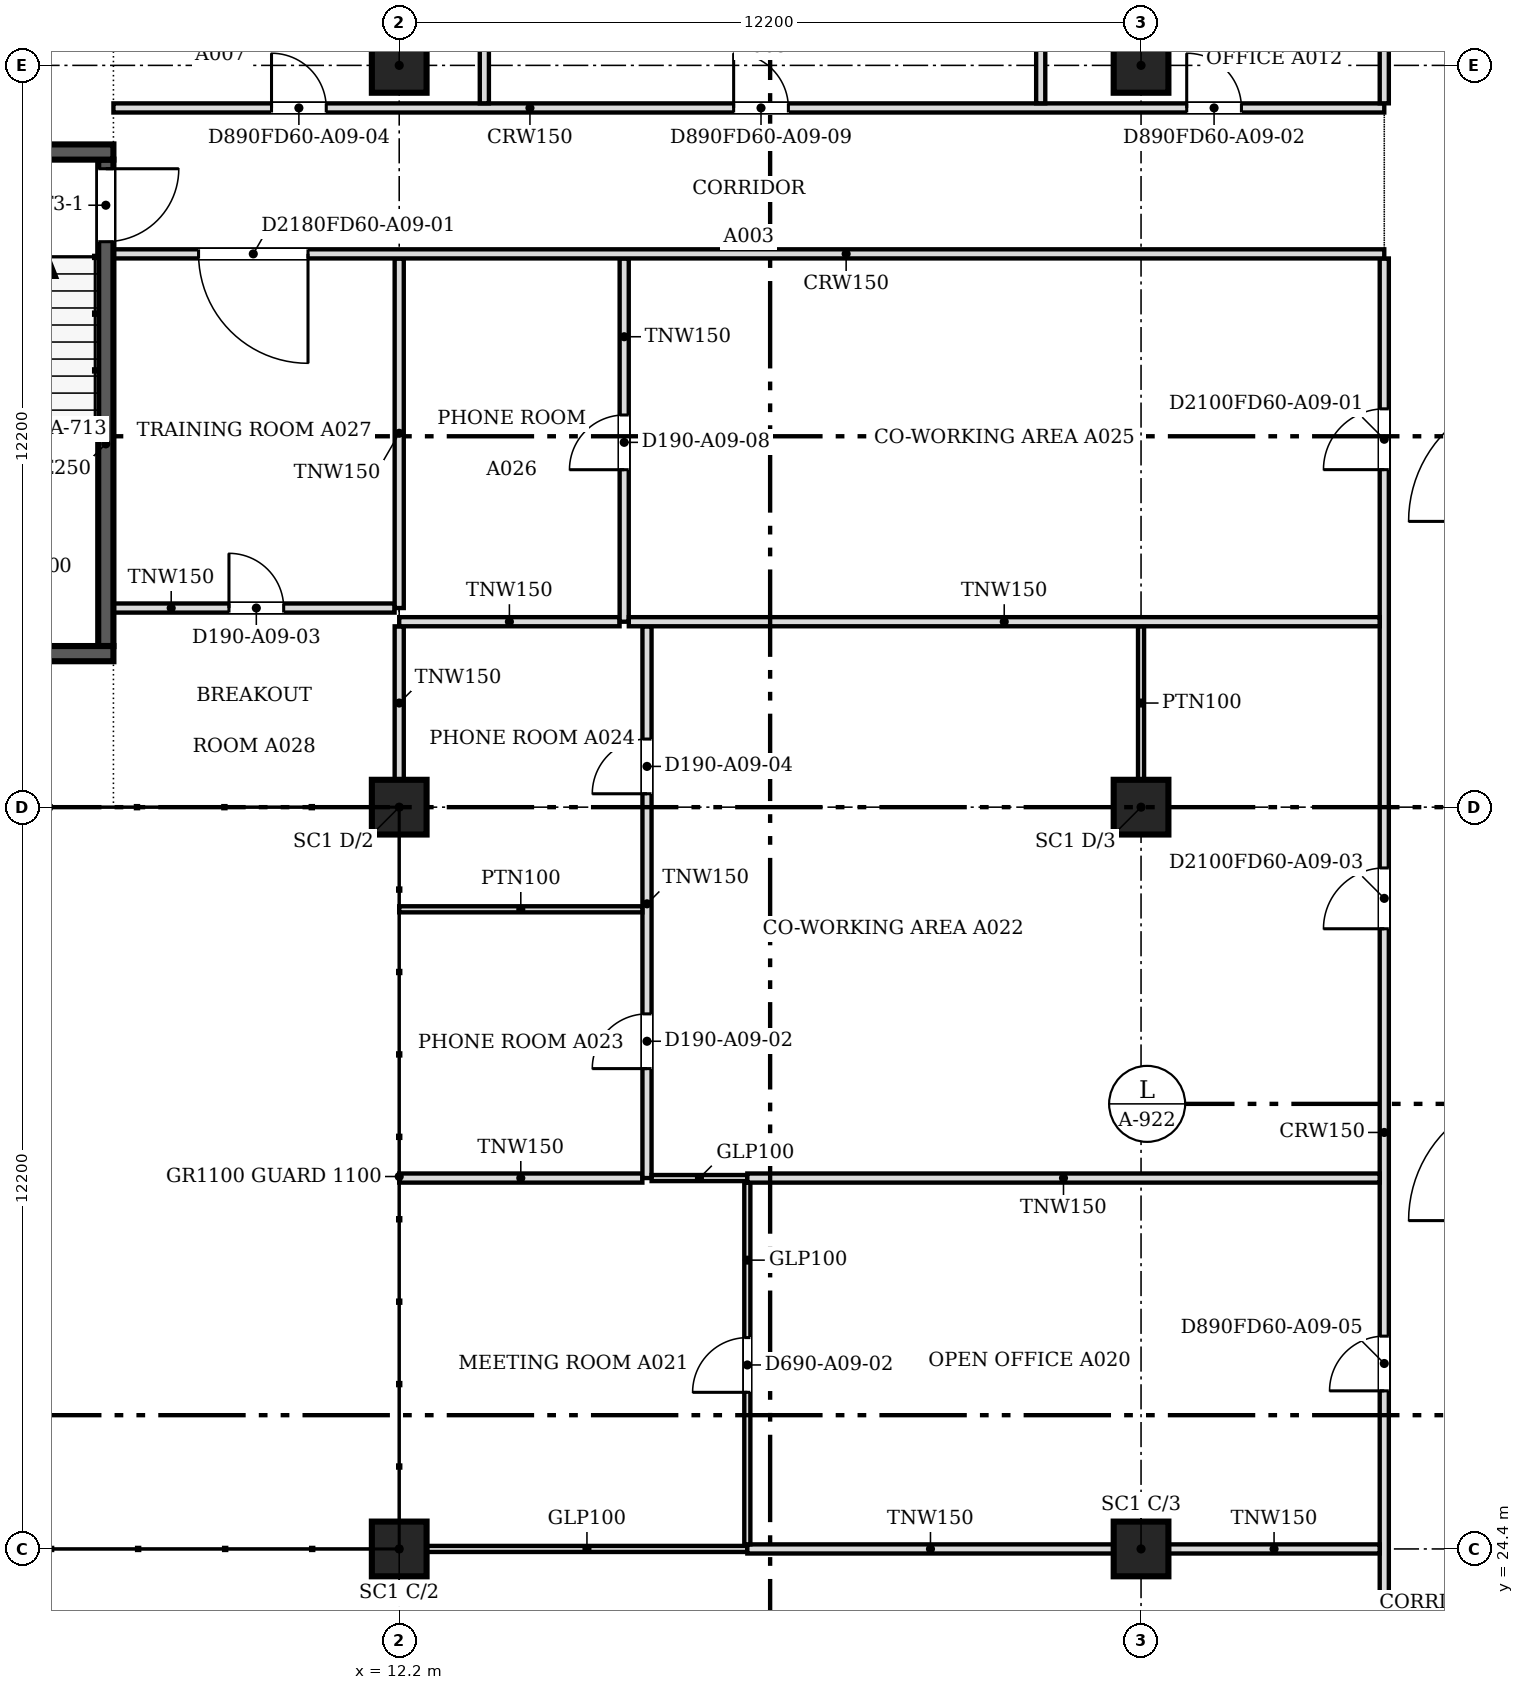
"""IFC4 building model, lengths in metres.
Left out: names, types, materials, properties, quantities, classifications, styles, units other than length and angle.
Written with IfcOpenShell. Run it as: python <this file> out.ifc"""

import sys

from ifc_helpers import new_model, si_unit, direction, frame, frame_2d, origin, origin_2d, place, context, subcontext, project, spatial, rectangle, extrude, source, transform, mapped, element, fill, save


model = new_model("IFC4")
c1 = context("Model", 3, precision=1e-05, world=origin(), true_north=direction((0.0, 1.0)))
c2 = subcontext(c1, "Body", "Model", "MODEL_VIEW")
j1 = project(units=[si_unit("LENGTHUNIT", "METRE"), si_unit("PLANEANGLEUNIT", "RADIAN")], contexts=[c1])
p1 = place(None, origin())
s1 = spatial("IfcSite", under=j1, at=p1, CompositionType="ELEMENT")
p2 = place(p1, origin())
s2 = spatial("IfcBuilding", under=s1, at=p2, CompositionType="ELEMENT")
p3 = place(p2, frame((0.0, 0.0, 102.8)))
s3 = spatial("IfcBuildingStorey", under=s2, at=p3, CompositionType="ELEMENT", Elevation=102.8)
for number, where, z_axis, x_axis in (
    (1, (12.2, 24.4, 0.0), (0.0, 0.0, 1.0), (1.0, 0.0, 0.0)),
    (2, (12.2, 36.6, 0.0), (0.0, 0.0, 1.0), (1.0, 0.0, 0.0)),
    (3, (12.2, 48.8, 0.0), (0.0, 0.0, 1.0), (1.0, 0.0, 0.0)),
    (4, (24.4, 24.4, 0.0), (0.0, 0.0, 1.0), (1.0, 0.0, 0.0)),
    (5, (24.4, 36.6, 0.0), (0.0, 0.0, 1.0), (1.0, 0.0, 0.0)),
    (6, (24.4, 48.8, 0.0), (0.0, 0.0, 1.0), (1.0, 0.0, 0.0)),
):
    element("IfcColumn", number, at=place(p3, frame(where, z_axis=z_axis, x_axis=x_axis)), inside=s3, PredefinedType="COLUMN", context=c2, shape_type="SweptSolid", body=[
        extrude(rectangle(XDim=0.9, YDim=0.9, at=origin_2d()), origin(), (0.0, 0.0, 1.0), 3.55),
    ])
for number, where, z_axis, x_axis in (
    (7, (7.5, 39.125, 0.0), (0.0, 0.0, 1.0), (-1.0, 0.0, 0.0)),
    (8, (3.6, 47.375, 0.0), (0.0, 0.0, 1.0), (1.0, 0.0, 0.0)),
):
    element("IfcWall", number, at=place(p3, frame(where, z_axis=z_axis, x_axis=x_axis)), inside=s3, PredefinedType="SOLIDWALL", context=c2, shape_type="SweptSolid", body=[
        extrude(rectangle(XDim=3.9, YDim=0.25, at=frame_2d((1.95, 0.0))), origin(), (0.0, 0.0, 1.0), 3.8),
    ])
p4 = place(p3, frame((7.375, 47.25, 0.0), z_axis=(0.0, 0.0, 1.0), x_axis=(0.0, -1.0, 0.0)))
e9 = element("IfcWall", 9, at=p4, inside=s3, PredefinedType="SOLIDWALL", context=c2, shape_type="SweptSolid", body=[
    extrude(rectangle(XDim=8.0, YDim=0.25, at=frame_2d((4.0, 0.0))), origin(), (0.0, 0.0, 1.0), 3.8),
])
m1 = source(origin(), c2, "Body", "SweptSolid", [
    extrude(rectangle(XDim=1.2, YDim=2.1, at=frame_2d((0.6, 1.05))), frame((0.0, 0.135, 0.0), z_axis=(0.0, -1.0, 0.0), x_axis=(1.0, 0.0, 0.0)), (0.0, 0.0, 1.0), 0.27),
])
p5 = place(p4, frame((0.15, 0.0, 0.0)))
e10 = element("IfcOpeningElement", 10, at=p5, cuts=e9, PredefinedType="OPENING", context=c2, shape_type="MappedRepresentation", body=[
    mapped(m1, transform((0.0, 0.0, 0.0), scale=1.0)),
])
p6 = place(p3, frame((28.4, 18.8, 0.0), z_axis=(0.0, 0.0, 1.0), x_axis=(0.0, 1.0, 0.0)))
e11 = element("IfcWall", 11, at=p6, inside=s3, PredefinedType="PARTITIONING", context=c2, shape_type="SweptSolid", body=[
    extrude(rectangle(XDim=26.824, YDim=0.15, at=frame_2d((13.412, 0.0))), origin(), (0.0, 0.0, 1.0), 2.715),
])
m2 = source(origin(), c2, "Body", "SweptSolid", [
    extrude(rectangle(XDim=0.9, YDim=2.1, at=frame_2d((0.45, 1.05))), frame((0.0, 0.085, 0.0), z_axis=(0.0, -1.0, 0.0), x_axis=(1.0, 0.0, 0.0)), (0.0, 0.0, 1.0), 0.17),
])
p7 = place(p6, frame((1.3, 0.0, 0.0)))
e12 = element("IfcOpeningElement", 12, at=p7, cuts=e11, PredefinedType="OPENING", context=c2, shape_type="MappedRepresentation", body=[
    mapped(m2, transform((0.0, 0.0, 0.0), scale=1.0)),
])
m3 = source(origin(), c2, "Body", "SweptSolid", [
    extrude(rectangle(XDim=1.0, YDim=2.1, at=frame_2d((0.5, 1.05))), frame((0.0, 0.085, 0.0), z_axis=(0.0, -1.0, 0.0), x_axis=(1.0, 0.0, 0.0)), (0.0, 0.0, 1.0), 0.17),
])
p8 = place(p6, frame((23.351, 0.0, 0.0)))
e13 = element("IfcOpeningElement", 13, at=p8, cuts=e11, PredefinedType="OPENING", context=c2, shape_type="MappedRepresentation", body=[
    mapped(m3, transform((0.0, 0.0, 0.0), scale=1.0)),
])
p9 = place(p6, frame((8.2, 0.0, 0.0)))
e14 = element("IfcOpeningElement", 14, at=p9, cuts=e11, PredefinedType="OPENING", context=c2, shape_type="MappedRepresentation", body=[
    mapped(m2, transform((0.0, 0.0, 0.0), scale=1.0)),
])
p10 = place(p6, frame((15.8, 0.0, 0.0)))
e15 = element("IfcOpeningElement", 15, at=p10, cuts=e11, PredefinedType="OPENING", context=c2, shape_type="MappedRepresentation", body=[
    mapped(m3, transform((0.0, 0.0, 0.0), scale=1.0)),
])
p11 = place(p3, frame((12.651, 24.4, 0.0), z_axis=(0.0, 0.0, 1.0), x_axis=(1.0, 0.0, 0.0)))
e16 = element("IfcWall", 16, at=p11, inside=s3, PredefinedType="PARTITIONING", context=c2, shape_type="SweptSolid", body=[
    extrude(rectangle(XDim=5.273, YDim=0.1, at=frame_2d((2.637, 0.0))), origin(), (0.0, 0.0, 1.0), 2.715),
])
p12 = place(p3, frame((17.925, 24.4, 0.0), z_axis=(0.0, 0.0, 1.0), x_axis=(1.0, 0.0, 0.0)))
e17 = element("IfcWall", 17, at=p12, inside=s3, PredefinedType="PARTITIONING", context=c2, shape_type="SweptSolid", body=[
    extrude(rectangle(XDim=6.024, YDim=0.15, at=frame_2d((3.012, 0.0))), origin(), (0.0, 0.0, 1.0), 2.715),
])
p13 = place(p3, frame((24.851, 24.4, 0.0), z_axis=(0.0, 0.0, 1.0), x_axis=(1.0, 0.0, 0.0)))
e18 = element("IfcWall", 18, at=p13, inside=s3, PredefinedType="PARTITIONING", context=c2, shape_type="SweptSolid", body=[
    extrude(rectangle(XDim=3.473, YDim=0.15, at=frame_2d((1.736, 0.0))), origin(), (0.0, 0.0, 1.0), 2.715),
])
p14 = place(p3, frame((17.925, 24.476, 0.0), z_axis=(0.0, 0.0, 1.0), x_axis=(0.0, 1.0, 0.0)))
e19 = element("IfcWall", 19, at=p14, inside=s3, PredefinedType="PARTITIONING", context=c2, shape_type="SweptSolid", body=[
    extrude(rectangle(XDim=5.948, YDim=0.1, at=frame_2d((2.974, 0.0))), origin(), (0.0, 0.0, 1.0), 2.715),
])
m4 = source(origin(), c2, "Body", "SweptSolid", [
    extrude(rectangle(XDim=0.9, YDim=2.1, at=frame_2d((0.45, 1.05))), frame((0.0, 0.06, 0.0), z_axis=(0.0, -1.0, 0.0), x_axis=(1.0, 0.0, 0.0)), (0.0, 0.0, 1.0), 0.12),
])
p15 = place(p14, frame((2.5, 0.0, 0.0)))
e20 = element("IfcOpeningElement", 20, at=p15, cuts=e19, PredefinedType="OPENING", context=c2, shape_type="MappedRepresentation", body=[
    mapped(m4, transform((0.0, 0.0, 0.0), scale=1.0)),
])
p16 = place(p3, frame((12.2, 30.5, 0.0), z_axis=(0.0, 0.0, 1.0), x_axis=(1.0, 0.0, 0.0)))
e21 = element("IfcWall", 21, at=p16, inside=s3, PredefinedType="PARTITIONING", context=c2, shape_type="SweptSolid", body=[
    extrude(rectangle(XDim=3.999, YDim=0.15, at=frame_2d((2.0, 0.0))), origin(), (0.0, 0.0, 1.0), 2.715),
])
p17 = place(p3, frame((16.275, 30.5, 0.0), z_axis=(0.0, 0.0, 1.0), x_axis=(0.0, 1.0, 0.0)))
e22 = element("IfcWall", 22, at=p17, inside=s3, PredefinedType="PARTITIONING", context=c2, shape_type="SweptSolid", body=[
    extrude(rectangle(XDim=9.074, YDim=0.15, at=frame_2d((4.537, 0.0))), origin(), (0.0, 0.0, 1.0), 2.715),
])
p18 = place(p17, frame((1.8, 0.0, 0.0)))
e23 = element("IfcOpeningElement", 23, at=p18, cuts=e22, PredefinedType="OPENING", context=c2, shape_type="MappedRepresentation", body=[
    mapped(m2, transform((0.0, 0.0, 0.0), scale=1.0)),
])
p19 = place(p17, frame((6.32, 0.0, 0.0)))
e24 = element("IfcOpeningElement", 24, at=p19, cuts=e22, PredefinedType="OPENING", context=c2, shape_type="MappedRepresentation", body=[
    mapped(m2, transform((0.0, 0.0, 0.0), scale=1.0)),
])
p20 = place(p3, frame((16.351, 30.5, 0.0), z_axis=(0.0, 0.0, 1.0), x_axis=(1.0, 0.0, 0.0)))
e25 = element("IfcWall", 25, at=p20, inside=s3, PredefinedType="PARTITIONING", context=c2, shape_type="SweptSolid", body=[
    extrude(rectangle(XDim=1.573, YDim=0.1, at=frame_2d((0.787, 0.0))), origin(), (0.0, 0.0, 1.0), 2.715),
])
p21 = place(p3, frame((17.925, 30.5, 0.0), z_axis=(0.0, 0.0, 1.0), x_axis=(1.0, 0.0, 0.0)))
e26 = element("IfcWall", 26, at=p21, inside=s3, PredefinedType="PARTITIONING", context=c2, shape_type="SweptSolid", body=[
    extrude(rectangle(XDim=10.399, YDim=0.15, at=frame_2d((5.199, 0.0))), origin(), (0.0, 0.0, 1.0), 2.715),
])
p22 = place(p3, frame((12.2, 34.92, 0.0), z_axis=(0.0, 0.0, 1.0), x_axis=(1.0, 0.0, 0.0)))
e27 = element("IfcWall", 27, at=p22, inside=s3, PredefinedType="PARTITIONING", context=c2, shape_type="SweptSolid", body=[
    extrude(rectangle(XDim=3.999, YDim=0.1, at=frame_2d((2.0, 0.0))), origin(), (0.0, 0.0, 1.0), 2.715),
])
p23 = place(p3, frame((12.2, 37.051, 0.0), z_axis=(0.0, 0.0, 1.0), x_axis=(0.0, 1.0, 0.0)))
e28 = element("IfcWall", 28, at=p23, inside=s3, PredefinedType="PARTITIONING", context=c2, shape_type="SweptSolid", body=[
    extrude(rectangle(XDim=2.523, YDim=0.15, at=frame_2d((1.261, 0.0))), origin(), (0.0, 0.0, 1.0), 2.715),
])
p24 = place(p3, frame((24.4, 37.05, 0.0), z_axis=(0.0, 0.0, 1.0), x_axis=(0.0, 1.0, 0.0)))
e29 = element("IfcWall", 29, at=p24, inside=s3, PredefinedType="PARTITIONING", context=c2, shape_type="SweptSolid", body=[
    extrude(rectangle(XDim=2.525, YDim=0.1, at=frame_2d((1.262, 0.0))), origin(), (0.0, 0.0, 1.0), 2.715),
])
p25 = place(p3, frame((12.2, 39.65, 0.0), z_axis=(0.0, 0.0, 1.0), x_axis=(1.0, 0.0, 0.0)))
e30 = element("IfcWall", 30, at=p25, inside=s3, PredefinedType="PARTITIONING", context=c2, shape_type="SweptSolid", body=[
    extrude(rectangle(XDim=3.624, YDim=0.15, at=frame_2d((1.812, 0.0))), origin(), (0.0, 0.0, 1.0), 2.715),
])
p26 = place(p3, frame((15.9, 39.65, 0.0), z_axis=(0.0, 0.0, 1.0), x_axis=(0.0, 1.0, 0.0)))
e31 = element("IfcWall", 31, at=p26, inside=s3, PredefinedType="PARTITIONING", context=c2, shape_type="SweptSolid", body=[
    extrude(rectangle(XDim=5.974, YDim=0.15, at=frame_2d((2.987, 0.0))), origin(), (0.0, 0.0, 1.0), 2.715),
])
p27 = place(p26, frame((2.5, 0.0, 0.0)))
e32 = element("IfcOpeningElement", 32, at=p27, cuts=e31, PredefinedType="OPENING", context=c2, shape_type="MappedRepresentation", body=[
    mapped(m2, transform((0.0, 0.0, 0.0), scale=1.0)),
])
p28 = place(p3, frame((15.976, 39.65, 0.0), z_axis=(0.0, 0.0, 1.0), x_axis=(1.0, 0.0, 0.0)))
e33 = element("IfcWall", 33, at=p28, inside=s3, PredefinedType="PARTITIONING", context=c2, shape_type="SweptSolid", body=[
    extrude(rectangle(XDim=12.348, YDim=0.15, at=frame_2d((6.174, 0.0))), origin(), (0.0, 0.0, 1.0), 2.715),
])
p29 = place(p3, frame((12.124, 39.875, 0.0), z_axis=(0.0, 0.0, 1.0), x_axis=(-1.0, 0.0, 0.0)))
e34 = element("IfcWall", 34, at=p29, inside=s3, PredefinedType="PARTITIONING", context=c2, shape_type="SweptSolid", body=[
    extrude(rectangle(XDim=4.624, YDim=0.15, at=frame_2d((2.312, 0.0))), origin(), (0.0, 0.0, 1.0), 2.715),
])
p30 = place(p29, frame((1.824, 0.0, 0.0)))
e35 = element("IfcOpeningElement", 35, at=p30, cuts=e34, PredefinedType="OPENING", context=c2, shape_type="MappedRepresentation", body=[
    mapped(m2, transform((0.0, 0.0, 0.0), scale=1.0)),
])
p31 = place(p3, frame((12.2, 39.875, 0.0), z_axis=(0.0, 0.0, 1.0), x_axis=(0.0, 1.0, 0.0)))
e36 = element("IfcWall", 36, at=p31, inside=s3, PredefinedType="PARTITIONING", context=c2, shape_type="SweptSolid", body=[
    extrude(rectangle(XDim=5.749, YDim=0.15, at=frame_2d((2.875, 0.0))), origin(), (0.0, 0.0, 1.0), 2.715),
])
p32 = place(p3, frame((28.4, 45.7, 0.0), z_axis=(0.0, 0.0, 1.0), x_axis=(-1.0, 0.0, 0.0)))
e37 = element("IfcWall", 37, at=p32, inside=s3, PredefinedType="PARTITIONING", context=c2, shape_type="SweptSolid", body=[
    extrude(rectangle(XDim=20.9, YDim=0.15, at=frame_2d((10.45, 0.0))), origin(), (0.0, 0.0, 1.0), 2.715),
])
m5 = source(origin(), c2, "Body", "SweptSolid", [
    extrude(rectangle(XDim=1.8, YDim=2.1, at=frame_2d((0.9, 1.05))), frame((0.0, 0.085, 0.0), z_axis=(0.0, -1.0, 0.0), x_axis=(1.0, 0.0, 0.0)), (0.0, 0.0, 1.0), 0.17),
])
p33 = place(p32, frame((17.7, 0.0, 0.0)))
e38 = element("IfcOpeningElement", 38, at=p33, cuts=e37, PredefinedType="OPENING", context=c2, shape_type="MappedRepresentation", body=[
    mapped(m5, transform((0.0, 0.0, 0.0), scale=1.0)),
])
p34 = place(p3, frame((7.5, 48.1, 0.0), z_axis=(0.0, 0.0, 1.0), x_axis=(1.0, 0.0, 0.0)))
e39 = element("IfcWall", 39, at=p34, inside=s3, PredefinedType="PARTITIONING", context=c2, shape_type="SweptSolid", body=[
    extrude(rectangle(XDim=20.9, YDim=0.15, at=frame_2d((10.45, 0.0))), origin(), (0.0, 0.0, 1.0), 2.715),
])
p35 = place(p34, frame((17.651, 0.0, 0.0)))
e40 = element("IfcOpeningElement", 40, at=p35, cuts=e39, PredefinedType="OPENING", context=c2, shape_type="MappedRepresentation", body=[
    mapped(m2, transform((0.0, 0.0, 0.0), scale=1.0)),
])
p36 = place(p34, frame((2.6, 0.0, 0.0)))
e41 = element("IfcOpeningElement", 41, at=p36, cuts=e39, PredefinedType="OPENING", context=c2, shape_type="MappedRepresentation", body=[
    mapped(m2, transform((0.0, 0.0, 0.0), scale=1.0)),
])
p37 = place(p34, frame((10.2, 0.0, 0.0)))
e42 = element("IfcOpeningElement", 42, at=p37, cuts=e39, PredefinedType="OPENING", context=c2, shape_type="MappedRepresentation", body=[
    mapped(m2, transform((0.0, 0.0, 0.0), scale=1.0)),
])
p38 = place(p3, frame((13.6, 48.176, 0.0), z_axis=(0.0, 0.0, 1.0), x_axis=(0.0, 1.0, 0.0)))
e43 = element("IfcWall", 43, at=p38, inside=s3, PredefinedType="PARTITIONING", context=c2, shape_type="SweptSolid", body=[
    extrude(rectangle(XDim=2.924, YDim=0.15, at=frame_2d((1.462, 0.0))), origin(), (0.0, 0.0, 1.0), 2.715),
])
p39 = place(p3, frame((22.75, 48.176, 0.0), z_axis=(0.0, 0.0, 1.0), x_axis=(0.0, 1.0, 0.0)))
e44 = element("IfcWall", 44, at=p39, inside=s3, PredefinedType="PARTITIONING", context=c2, shape_type="SweptSolid", body=[
    extrude(rectangle(XDim=6.224, YDim=0.15, at=frame_2d((3.112, 0.0))), origin(), (0.0, 0.0, 1.0), 2.715),
])
p40 = place(p3, frame((28.4, 48.176, 0.0), z_axis=(0.0, 0.0, 1.0), x_axis=(0.0, 1.0, 0.0)))
e45 = element("IfcWall", 45, at=p40, inside=s3, PredefinedType="PARTITIONING", context=c2, shape_type="SweptSolid", body=[
    extrude(rectangle(XDim=2.648, YDim=0.15, at=frame_2d((1.324, 0.0))), origin(), (0.0, 0.0, 1.0), 2.715),
])
m6 = source(origin(), c2, "Body", "SweptSolid", [
    extrude(rectangle(XDim=1.2, YDim=2.1, at=frame_2d((0.6, 1.05))), frame((0.0, 0.025, 0.0), z_axis=(0.0, -1.0, 0.0), x_axis=(1.0, 0.0, 0.0)), (0.0, 0.0, 1.0), 0.05),
])
p41 = place(p5, origin())
e46 = element("IfcDoor", 46, at=p41, inside=s3, OperationType="SINGLE_SWING_LEFT", PredefinedType="DOOR", context=c2, shape_type="MappedRepresentation", body=[
    mapped(m6, transform((0.0, 0.0, 0.0), scale=1.0)),
])
fill(e10, e46)
m7 = source(origin(), c2, "Body", "SweptSolid", [
    extrude(rectangle(XDim=0.9, YDim=2.1, at=frame_2d((0.45, 1.05))), frame((0.0, 0.025, 0.0), z_axis=(0.0, -1.0, 0.0), x_axis=(1.0, 0.0, 0.0)), (0.0, 0.0, 1.0), 0.05),
])
p42 = place(p18, origin())
e47 = element("IfcDoor", 47, at=p42, inside=s3, OperationType="SINGLE_SWING_LEFT", PredefinedType="DOOR", context=c2, shape_type="MappedRepresentation", body=[
    mapped(m7, transform((0.0, 0.0, 0.0), scale=1.0)),
])
fill(e23, e47)
p43 = place(p30, origin())
e48 = element("IfcDoor", 48, at=p43, inside=s3, OperationType="SINGLE_SWING_RIGHT", PredefinedType="DOOR", context=c2, shape_type="MappedRepresentation", body=[
    mapped(m7, transform((0.0, 0.0, 0.0), scale=1.0)),
])
fill(e35, e48)
p44 = place(p19, origin())
e49 = element("IfcDoor", 49, at=p44, inside=s3, OperationType="SINGLE_SWING_LEFT", PredefinedType="DOOR", context=c2, shape_type="MappedRepresentation", body=[
    mapped(m7, transform((0.0, 0.0, 0.0), scale=1.0)),
])
fill(e24, e49)
m8 = source(origin(), c2, "Body", "SweptSolid", [
    extrude(rectangle(XDim=1.8, YDim=2.1, at=frame_2d((0.9, 1.05))), frame((0.0, 0.025, 0.0), z_axis=(0.0, -1.0, 0.0), x_axis=(1.0, 0.0, 0.0)), (0.0, 0.0, 1.0), 0.05),
])
p45 = place(p33, origin())
e50 = element("IfcDoor", 50, at=p45, inside=s3, OperationType="DOUBLE_DOOR_SINGLE_SWING", PredefinedType="DOOR", context=c2, shape_type="MappedRepresentation", body=[
    mapped(m8, transform((0.0, 0.0, 0.0), scale=1.0)),
])
fill(e38, e50)
p46 = place(p35, origin())
e51 = element("IfcDoor", 51, at=p46, inside=s3, OperationType="SINGLE_SWING_LEFT", PredefinedType="DOOR", context=c2, shape_type="MappedRepresentation", body=[
    mapped(m7, transform((0.0, 0.0, 0.0), scale=1.0)),
])
fill(e40, e51)
p47 = place(p15, origin())
e52 = element("IfcDoor", 52, at=p47, inside=s3, OperationType="SINGLE_SWING_LEFT", PredefinedType="DOOR", context=c2, shape_type="MappedRepresentation", body=[
    mapped(m7, transform((0.0, 0.0, 0.0), scale=1.0)),
])
fill(e20, e52)
m9 = source(origin(), c2, "Body", "SweptSolid", [
    extrude(rectangle(XDim=1.0, YDim=2.1, at=frame_2d((0.5, 1.05))), frame((0.0, 0.025, 0.0), z_axis=(0.0, -1.0, 0.0), x_axis=(1.0, 0.0, 0.0)), (0.0, 0.0, 1.0), 0.05),
])
p48 = place(p8, origin())
e53 = element("IfcDoor", 53, at=p48, inside=s3, OperationType="SINGLE_SWING_LEFT", PredefinedType="DOOR", context=c2, shape_type="MappedRepresentation", body=[
    mapped(m9, transform((0.0, 0.0, 0.0), scale=1.0)),
])
fill(e13, e53)
p49 = place(p27, origin())
e54 = element("IfcDoor", 54, at=p49, inside=s3, OperationType="SINGLE_SWING_LEFT", PredefinedType="DOOR", context=c2, shape_type="MappedRepresentation", body=[
    mapped(m7, transform((0.0, 0.0, 0.0), scale=1.0)),
])
fill(e32, e54)
p50 = place(p36, origin())
e55 = element("IfcDoor", 55, at=p50, inside=s3, OperationType="SINGLE_SWING_LEFT", PredefinedType="DOOR", context=c2, shape_type="MappedRepresentation", body=[
    mapped(m7, transform((0.0, 0.0, 0.0), scale=1.0)),
])
fill(e41, e55)
p51 = place(p9, origin())
e56 = element("IfcDoor", 56, at=p51, inside=s3, OperationType="SINGLE_SWING_LEFT", PredefinedType="DOOR", context=c2, shape_type="MappedRepresentation", body=[
    mapped(m7, transform((0.0, 0.0, 0.0), scale=1.0)),
])
fill(e14, e56)
p52 = place(p10, origin())
e57 = element("IfcDoor", 57, at=p52, inside=s3, OperationType="SINGLE_SWING_LEFT", PredefinedType="DOOR", context=c2, shape_type="MappedRepresentation", body=[
    mapped(m9, transform((0.0, 0.0, 0.0), scale=1.0)),
])
fill(e15, e57)
p53 = place(p37, origin())
e58 = element("IfcDoor", 58, at=p53, inside=s3, OperationType="SINGLE_SWING_LEFT", PredefinedType="DOOR", context=c2, shape_type="MappedRepresentation", body=[
    mapped(m7, transform((0.0, 0.0, 0.0), scale=1.0)),
])
fill(e42, e58)
save(model, sys.argv[1])
